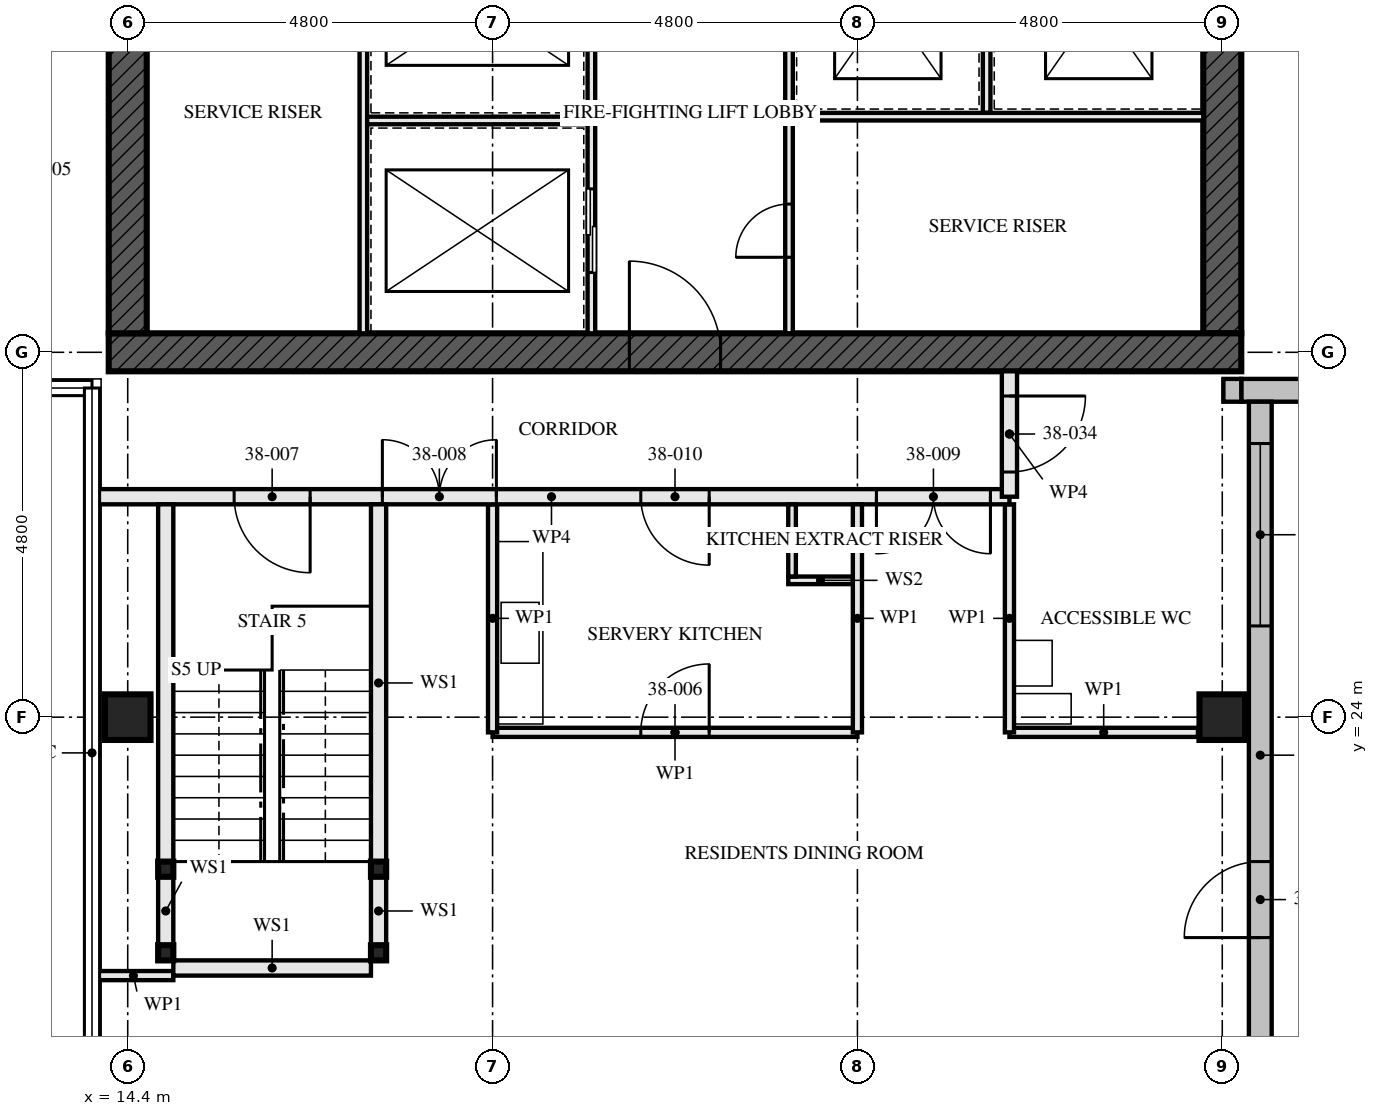
"""IFC4 building model, lengths in metres.
Left out: names, types, materials, properties, quantities, classifications, styles, units other than length and angle.
Written with IfcOpenShell. Run it as: python <this file> out.ifc"""

import sys

from ifc_helpers import new_model, si_unit, direction, frame, frame_2d, origin, origin_2d, place, context, subcontext, project, spatial, rectangle, hollow_rectangle, extrude, element, fill, save


model = new_model("IFC4")
c1 = context("Model", 3, precision=1e-05, world=origin(), true_north=direction((0.0, 1.0)))
c2 = subcontext(c1, "Body", "Model", "MODEL_VIEW")
j1 = project(units=[si_unit("LENGTHUNIT", "METRE"), si_unit("PLANEANGLEUNIT", "RADIAN")], contexts=[c1])
p1 = place(None, origin())
s1 = spatial("IfcSite", under=j1, at=p1, CompositionType="ELEMENT")
p2 = place(p1, origin())
s2 = spatial("IfcBuilding", under=s1, at=p2, CompositionType="ELEMENT")
p3 = place(p2, frame((0.0, 0.0, 141.0)))
s3 = spatial("IfcBuildingStorey", under=s2, at=p3, CompositionType="ELEMENT", Elevation=141.0)
for number, where, z_axis, x_axis in (
    (1, (14.4, 24.0, 0.0), (0.0, 0.0, 1.0), (1.0, 0.0, 0.0)),
    (2, (28.8, 24.0, 0.0), (0.0, 0.0, 1.0), (1.0, 0.0, 0.0)),
):
    element("IfcColumn", number, at=place(p3, frame(where, z_axis=z_axis, x_axis=x_axis)), inside=s3, PredefinedType="COLUMN", context=c2, shape_type="SweptSolid", body=[
        extrude(hollow_rectangle(XDim=0.6, YDim=0.6, WallThickness=0.08, at=origin_2d()), origin(), (0.0, 0.0, 1.0), 3.5),
    ])
p4 = place(p3, frame((14.15, 28.8, -0.17), z_axis=(0.0, 0.0, 1.0), x_axis=(1.0, 0.0, 0.0)))
e3 = element("IfcWall", 3, at=p4, inside=s3, PredefinedType="SHEAR", context=c2, shape_type="SweptSolid", body=[
    extrude(rectangle(XDim=14.9, YDim=0.5, at=frame_2d((7.45, 0.0))), origin(), (0.0, 0.0, 1.0), 3.5),
])
p5 = place(p4, frame((6.85, 0.0, 0.17)))
e4 = element("IfcOpeningElement", 4, at=p5, cuts=e3, PredefinedType="OPENING", context=c2, shape_type="SweptSolid", body=[
    extrude(rectangle(XDim=1.2, YDim=2.1, at=frame_2d((0.6, 1.05))), frame((0.0, 0.26, 0.0), z_axis=(0.0, -1.0, 0.0), x_axis=(1.0, 0.0, 0.0)), (0.0, 0.0, 1.0), 0.521),
])
p6 = place(p3, frame((14.4, 42.95, -0.17), z_axis=(0.0, 0.0, 1.0), x_axis=(0.0, -1.0, 0.0)))
e5 = element("IfcWall", 5, at=p6, inside=s3, PredefinedType="SHEAR", context=c2, shape_type="SweptSolid", body=[
    extrude(rectangle(XDim=13.9, YDim=0.5, at=frame_2d((6.95, 0.0))), origin(), (0.0, 0.0, 1.0), 3.5),
])
p7 = place(p6, frame((6.35, 0.0, 0.17)))
e6 = element("IfcOpeningElement", 6, at=p7, cuts=e5, PredefinedType="OPENING", context=c2, shape_type="SweptSolid", body=[
    extrude(rectangle(XDim=1.2, YDim=2.1, at=frame_2d((0.6, 1.05))), frame((0.0, 0.26, 0.0), z_axis=(0.0, -1.0, 0.0), x_axis=(1.0, 0.0, 0.0)), (0.0, 0.0, 1.0), 0.521),
])
p8 = place(p3, frame((28.8, 29.05, -0.17), z_axis=(0.0, 0.0, 1.0), x_axis=(0.0, 1.0, 0.0)))
e7 = element("IfcWall", 7, at=p8, inside=s3, PredefinedType="SHEAR", context=c2, shape_type="SweptSolid", body=[
    extrude(rectangle(XDim=13.9, YDim=0.5, at=frame_2d((6.95, 0.0))), origin(), (0.0, 0.0, 1.0), 3.5),
])
p9 = place(p8, frame((6.35, 0.0, 0.17)))
e8 = element("IfcOpeningElement", 8, at=p9, cuts=e7, PredefinedType="OPENING", context=c2, shape_type="SweptSolid", body=[
    extrude(rectangle(XDim=1.2, YDim=2.1, at=frame_2d((0.6, 1.05))), frame((0.0, 0.26, 0.0), z_axis=(0.0, -1.0, 0.0), x_axis=(1.0, 0.0, 0.0)), (0.0, 0.0, 1.0), 0.521),
])
for number, where, z_axis, x_axis in (
    (9, (14.9, 20.9, 0.0), (0.0, 0.0, 1.0), (1.0, 0.0, 0.0)),
    (10, (17.7, 20.9, 0.0), (0.0, 0.0, 1.0), (1.0, 0.0, 0.0)),
    (11, (14.9, 22.0, 0.0), (0.0, 0.0, 1.0), (1.0, 0.0, 0.0)),
    (12, (17.7, 22.0, 0.0), (0.0, 0.0, 1.0), (1.0, 0.0, 0.0)),
):
    element("IfcColumn", number, at=place(p3, frame(where, z_axis=z_axis, x_axis=x_axis)), inside=s3, PredefinedType="COLUMN", context=c2, shape_type="SweptSolid", body=[
        extrude(hollow_rectangle(XDim=0.2, YDim=0.2, WallThickness=0.008, at=origin_2d()), origin(), (0.0, 0.0, 1.0), 3.33),
    ])
p10 = place(p3, frame((29.05, 28.3, 0.0), z_axis=(0.0, 0.0, 1.0), x_axis=(1.0, 0.0, 0.0)))
e13 = element("IfcWall", 13, at=p10, inside=s3, PredefinedType="SOLIDWALL", context=c2, shape_type="SweptSolid", body=[
    extrude(rectangle(XDim=10.0, YDim=0.3, at=frame_2d((5.0, 0.0))), origin(), (0.0, 0.0, 1.0), 3.5),
])
p11 = place(p10, frame((0.95, 0.0, 0.6)))
e14 = element("IfcOpeningElement", 14, at=p11, cuts=e13, PredefinedType="OPENING", context=c2, shape_type="SweptSolid", body=[
    extrude(rectangle(XDim=2.4, YDim=1.8, at=frame_2d((1.2, 0.9))), frame((0.0, 0.161, 0.0), z_axis=(0.0, -1.0, 0.0), x_axis=(1.0, 0.0, 0.0)), (0.0, 0.0, 1.0), 0.321),
])
p12 = place(p10, frame((5.75, 0.0, 0.6)))
e15 = element("IfcOpeningElement", 15, at=p12, cuts=e13, PredefinedType="OPENING", context=c2, shape_type="SweptSolid", body=[
    extrude(rectangle(XDim=2.4, YDim=1.8, at=frame_2d((1.2, 0.9))), frame((0.0, 0.161, 0.0), z_axis=(0.0, -1.0, 0.0), x_axis=(1.0, 0.0, 0.0)), (0.0, 0.0, 1.0), 0.321),
])
p13 = place(p3, frame((29.3, 18.85, 0.0), z_axis=(0.0, 0.0, 1.0), x_axis=(0.0, 1.0, 0.0)))
e16 = element("IfcWall", 16, at=p13, inside=s3, PredefinedType="SOLIDWALL", context=c2, shape_type="SweptSolid", body=[
    extrude(rectangle(XDim=9.3, YDim=0.3, at=frame_2d((4.65, 0.0))), origin(), (0.0, 0.0, 1.0), 3.5),
])
p14 = place(p13, frame((2.25, 0.0, 0.0)))
e17 = element("IfcOpeningElement", 17, at=p14, cuts=e16, PredefinedType="OPENING", context=c2, shape_type="SweptSolid", body=[
    extrude(rectangle(XDim=1.0, YDim=2.4, at=frame_2d((0.5, 1.2))), frame((0.0, 0.161, 0.0), z_axis=(0.0, -1.0, 0.0), x_axis=(1.0, 0.0, 0.0)), (0.0, 0.0, 1.0), 0.321),
])
p15 = place(p13, frame((6.35, 0.0, 0.6)))
e18 = element("IfcOpeningElement", 18, at=p15, cuts=e16, PredefinedType="OPENING", context=c2, shape_type="SweptSolid", body=[
    extrude(rectangle(XDim=2.4, YDim=1.8, at=frame_2d((1.2, 0.9))), frame((0.0, 0.161, 0.0), z_axis=(0.0, -1.0, 0.0), x_axis=(1.0, 0.0, 0.0)), (0.0, 0.0, 1.0), 0.321),
])
p16 = place(p3, frame((28.815, 28.3, 2.39), z_axis=(0.0, 0.0, 1.0), x_axis=(1.0, 0.0, 0.0)))
e19 = element("IfcWall", 19, at=p16, inside=s3, PredefinedType="SOLIDWALL", context=c2, shape_type="SweptSolid", body=[
    extrude(rectangle(XDim=0.235, YDim=0.3, at=frame_2d((0.118, 0.0))), origin(), (0.0, 0.0, 1.0), 0.88),
])
p17 = place(p3, frame((14.9, 21.0, 0.0), z_axis=(0.0, 0.0, 1.0), x_axis=(0.0, 1.0, 0.0)))
e20 = element("IfcWall", 20, at=p17, inside=s3, PredefinedType="SOLIDWALL", context=c2, shape_type="SweptSolid", body=[
    extrude(rectangle(XDim=0.9, YDim=0.2, at=frame_2d((0.45, 0.0))), origin(), (0.0, 0.0, 1.0), 2.99),
])
p18 = place(p3, frame((14.9, 22.1, 0.0), z_axis=(0.0, 0.0, 1.0), x_axis=(0.0, 1.0, 0.0)))
e21 = element("IfcWall", 21, at=p18, inside=s3, PredefinedType="SOLIDWALL", context=c2, shape_type="SweptSolid", body=[
    extrude(rectangle(XDim=4.7, YDim=0.2, at=frame_2d((2.35, 0.0))), origin(), (0.0, 0.0, 1.0), 2.99),
])
p19 = place(p3, frame((17.7, 21.0, 0.0), z_axis=(0.0, 0.0, 1.0), x_axis=(0.0, 1.0, 0.0)))
e22 = element("IfcWall", 22, at=p19, inside=s3, PredefinedType="SOLIDWALL", context=c2, shape_type="SweptSolid", body=[
    extrude(rectangle(XDim=0.9, YDim=0.2, at=frame_2d((0.45, 0.0))), origin(), (0.0, 0.0, 1.0), 2.99),
])
p20 = place(p3, frame((17.7, 22.1, 0.0), z_axis=(0.0, 0.0, 1.0), x_axis=(0.0, 1.0, 0.0)))
e23 = element("IfcWall", 23, at=p20, inside=s3, PredefinedType="SOLIDWALL", context=c2, shape_type="SweptSolid", body=[
    extrude(rectangle(XDim=4.7, YDim=0.2, at=frame_2d((2.35, 0.0))), origin(), (0.0, 0.0, 1.0), 2.99),
])
p21 = place(p3, frame((15.0, 20.7, 0.0), z_axis=(0.0, 0.0, 1.0), x_axis=(1.0, 0.0, 0.0)))
e24 = element("IfcWall", 24, at=p21, inside=s3, PredefinedType="SOLIDWALL", context=c2, shape_type="SweptSolid", body=[
    extrude(rectangle(XDim=2.6, YDim=0.2, at=frame_2d((1.3, 0.0))), origin(), (0.0, 0.0, 1.0), 3.33),
])
p22 = place(p3, frame((24.0, 23.8, 0.0), z_axis=(0.0, 0.0, 1.0), x_axis=(0.0, 1.0, 0.0)))
e25 = element("IfcWall", 25, at=p22, inside=s3, PredefinedType="PARTITIONING", context=c2, shape_type="SweptSolid", body=[
    extrude(rectangle(XDim=3.0, YDim=0.12, at=frame_2d((1.5, 0.0))), origin(), (0.0, 0.0, 1.0), 2.55),
])
p23 = place(p3, frame((23.14, 25.85, 0.0), z_axis=(0.0, 0.0, 1.0), x_axis=(0.0, 1.0, 0.0)))
e26 = element("IfcWall", 26, at=p23, inside=s3, PredefinedType="SOLIDWALL", context=c2, shape_type="SweptSolid", body=[
    extrude(rectangle(XDim=0.95, YDim=0.1, at=frame_2d((0.475, 0.0))), origin(), (0.0, 0.0, 1.0), 3.33),
])
p24 = place(p3, frame((23.09, 25.8, 0.0), z_axis=(0.0, 0.0, 1.0), x_axis=(1.0, 0.0, 0.0)))
e27 = element("IfcWall", 27, at=p24, inside=s3, PredefinedType="SOLIDWALL", context=c2, shape_type="SweptSolid", body=[
    extrude(rectangle(XDim=0.85, YDim=0.1, at=frame_2d((0.425, 0.0))), origin(), (0.0, 0.0, 1.0), 3.33),
])
p25 = place(p3, frame((19.2, 23.8, 0.0), z_axis=(0.0, 0.0, 1.0), x_axis=(0.0, 1.0, 0.0)))
e28 = element("IfcWall", 28, at=p25, inside=s3, PredefinedType="PARTITIONING", context=c2, shape_type="SweptSolid", body=[
    extrude(rectangle(XDim=3.0, YDim=0.12, at=frame_2d((1.5, 0.0))), origin(), (0.0, 0.0, 1.0), 2.55),
])
p26 = place(p3, frame((19.2, 23.8, 0.0), z_axis=(0.0, 0.0, 1.0), x_axis=(1.0, 0.0, 0.0)))
e29 = element("IfcWall", 29, at=p26, inside=s3, PredefinedType="PARTITIONING", context=c2, shape_type="SweptSolid", body=[
    extrude(rectangle(XDim=4.8, YDim=0.12, at=frame_2d((2.4, 0.0))), origin(), (0.0, 0.0, 1.0), 3.33),
])
p27 = place(p26, frame((1.95, 0.0, 0.0)))
e30 = element("IfcOpeningElement", 30, at=p27, cuts=e29, PredefinedType="OPENING", context=c2, shape_type="SweptSolid", body=[
    extrude(rectangle(XDim=0.9, YDim=2.1, at=frame_2d((0.45, 1.05))), frame((0.0, 0.071, 0.0), z_axis=(0.0, -1.0, 0.0), x_axis=(1.0, 0.0, 0.0)), (0.0, 0.0, 1.0), 0.141),
])
p28 = place(p3, frame((26.0, 23.8, 0.0), z_axis=(0.0, 0.0, 1.0), x_axis=(0.0, 1.0, 0.0)))
e31 = element("IfcWall", 31, at=p28, inside=s3, PredefinedType="PARTITIONING", context=c2, shape_type="SweptSolid", body=[
    extrude(rectangle(XDim=3.0, YDim=0.12, at=frame_2d((1.5, 0.0))), origin(), (0.0, 0.0, 1.0), 2.55),
])
p29 = place(p3, frame((26.0, 23.8, 0.0), z_axis=(0.0, 0.0, 1.0), x_axis=(1.0, 0.0, 0.0)))
e32 = element("IfcWall", 32, at=p29, inside=s3, PredefinedType="PARTITIONING", context=c2, shape_type="SweptSolid", body=[
    extrude(rectangle(XDim=2.48, YDim=0.12, at=frame_2d((1.24, 0.0))), origin(), (0.0, 0.0, 1.0), 3.33),
])
p30 = place(p3, frame((13.95, 20.6, 0.0), z_axis=(0.0, 0.0, 1.0), x_axis=(1.0, 0.0, 0.0)))
e33 = element("IfcWall", 33, at=p30, inside=s3, PredefinedType="PARTITIONING", context=c2, shape_type="SweptSolid", body=[
    extrude(rectangle(XDim=1.05, YDim=0.12, at=frame_2d((0.525, 0.0))), origin(), (0.0, 0.0, 1.0), 2.32),
])
p31 = place(p3, frame((13.95, 26.9, 0.0), z_axis=(0.0, 0.0, 1.0), x_axis=(1.0, 0.0, 0.0)))
e34 = element("IfcWall", 34, at=p31, inside=s3, PredefinedType="PARTITIONING", context=c2, shape_type="SweptSolid", body=[
    extrude(rectangle(XDim=12.05, YDim=0.2, at=frame_2d((6.025, 0.0))), origin(), (0.0, 0.0, 1.0), 2.32),
])
p32 = place(p31, frame((1.85, 0.0, 0.0)))
e35 = element("IfcOpeningElement", 35, at=p32, cuts=e34, PredefinedType="OPENING", context=c2, shape_type="SweptSolid", body=[
    extrude(rectangle(XDim=1.0, YDim=2.1, at=frame_2d((0.5, 1.05))), frame((0.0, 0.111, 0.0), z_axis=(0.0, -1.0, 0.0), x_axis=(1.0, 0.0, 0.0)), (0.0, 0.0, 1.0), 0.221),
])
p33 = place(p31, frame((3.8, 0.0, 0.0)))
e36 = element("IfcOpeningElement", 36, at=p33, cuts=e34, PredefinedType="OPENING", context=c2, shape_type="SweptSolid", body=[
    extrude(rectangle(XDim=1.5, YDim=2.1, at=frame_2d((0.75, 1.05))), frame((0.0, 0.111, 0.0), z_axis=(0.0, -1.0, 0.0), x_axis=(1.0, 0.0, 0.0)), (0.0, 0.0, 1.0), 0.221),
])
p34 = place(p31, frame((10.3, 0.0, 0.0)))
e37 = element("IfcOpeningElement", 37, at=p34, cuts=e34, PredefinedType="OPENING", context=c2, shape_type="SweptSolid", body=[
    extrude(rectangle(XDim=1.5, YDim=2.1, at=frame_2d((0.75, 1.05))), frame((0.0, 0.111, 0.0), z_axis=(0.0, -1.0, 0.0), x_axis=(1.0, 0.0, 0.0)), (0.0, 0.0, 1.0), 0.221),
])
p35 = place(p31, frame((7.2, 0.0, 0.0)))
e38 = element("IfcOpeningElement", 38, at=p35, cuts=e34, PredefinedType="OPENING", context=c2, shape_type="SweptSolid", body=[
    extrude(rectangle(XDim=0.9, YDim=2.1, at=frame_2d((0.45, 1.05))), frame((0.0, 0.111, 0.0), z_axis=(0.0, -1.0, 0.0), x_axis=(1.0, 0.0, 0.0)), (0.0, 0.0, 1.0), 0.221),
])
p36 = place(p3, frame((20.5, 29.05, 0.0), z_axis=(0.0, 0.0, 1.0), x_axis=(0.0, 1.0, 0.0)))
e39 = element("IfcWall", 39, at=p36, inside=s3, PredefinedType="SOLIDWALL", context=c2, shape_type="SweptSolid", body=[
    extrude(rectangle(XDim=5.8, YDim=0.1, at=frame_2d((2.9, 0.0))), origin(), (0.0, 0.0, 1.0), 3.33),
])
p37 = place(p36, frame((0.8, 0.0, 0.0)))
e40 = element("IfcOpeningElement", 40, at=p37, cuts=e39, PredefinedType="OPENING", context=c2, shape_type="SweptSolid", body=[
    extrude(rectangle(XDim=1.1, YDim=2.3, at=frame_2d((0.55, 1.15))), frame((0.0, 0.061, 0.0), z_axis=(0.0, -1.0, 0.0), x_axis=(1.0, 0.0, 0.0)), (0.0, 0.0, 1.0), 0.121),
])
p38 = place(p36, frame((3.775, 0.0, 0.0)))
e41 = element("IfcOpeningElement", 41, at=p38, cuts=e39, PredefinedType="OPENING", context=c2, shape_type="SweptSolid", body=[
    extrude(rectangle(XDim=1.1, YDim=2.3, at=frame_2d((0.55, 1.15))), frame((0.0, 0.061, 0.0), z_axis=(0.0, -1.0, 0.0), x_axis=(1.0, 0.0, 0.0)), (0.0, 0.0, 1.0), 0.121),
])
p39 = place(p3, frame((23.1, 29.05, 0.0), z_axis=(0.0, 0.0, 1.0), x_axis=(0.0, 1.0, 0.0)))
e42 = element("IfcWall", 42, at=p39, inside=s3, PredefinedType="SOLIDWALL", context=c2, shape_type="SweptSolid", body=[
    extrude(rectangle(XDim=5.8, YDim=0.1, at=frame_2d((2.9, 0.0))), origin(), (0.0, 0.0, 1.0), 3.33),
])
p40 = place(p39, frame((1.0, 0.0, 0.0)))
e43 = element("IfcOpeningElement", 43, at=p40, cuts=e42, PredefinedType="OPENING", context=c2, shape_type="SweptSolid", body=[
    extrude(rectangle(XDim=0.7, YDim=2.1, at=frame_2d((0.35, 1.05))), frame((0.0, 0.061, 0.0), z_axis=(0.0, -1.0, 0.0), x_axis=(1.0, 0.0, 0.0)), (0.0, 0.0, 1.0), 0.121),
])
p41 = place(p3, frame((17.5, 29.05, 0.0), z_axis=(0.0, 0.0, 1.0), x_axis=(0.0, 1.0, 0.0)))
e44 = element("IfcWall", 44, at=p41, inside=s3, PredefinedType="SOLIDWALL", context=c2, shape_type="SweptSolid", body=[
    extrude(rectangle(XDim=5.8, YDim=0.1, at=frame_2d((2.9, 0.0))), origin(), (0.0, 0.0, 1.0), 3.33),
])
p42 = place(p3, frame((17.55, 31.85, 0.0), z_axis=(0.0, 0.0, 1.0), x_axis=(1.0, 0.0, 0.0)))
e45 = element("IfcWall", 45, at=p42, inside=s3, PredefinedType="SOLIDWALL", context=c2, shape_type="SweptSolid", body=[
    extrude(rectangle(XDim=2.9, YDim=0.1, at=frame_2d((1.45, 0.0))), origin(), (0.0, 0.0, 1.0), 3.33),
])
p43 = place(p3, frame((25.7, 31.95, 0.0), z_axis=(0.0, 0.0, 1.0), x_axis=(0.0, 1.0, 0.0)))
e46 = element("IfcWall", 46, at=p43, inside=s3, PredefinedType="SOLIDWALL", context=c2, shape_type="SweptSolid", body=[
    extrude(rectangle(XDim=2.9, YDim=0.1, at=frame_2d((1.45, 0.0))), origin(), (0.0, 0.0, 1.0), 3.33),
])
p44 = place(p3, frame((23.15, 31.9, 0.0), z_axis=(0.0, 0.0, 1.0), x_axis=(1.0, 0.0, 0.0)))
e47 = element("IfcWall", 47, at=p44, inside=s3, PredefinedType="SOLIDWALL", context=c2, shape_type="SweptSolid", body=[
    extrude(rectangle(XDim=5.4, YDim=0.1, at=frame_2d((2.7, 0.0))), origin(), (0.0, 0.0, 1.0), 3.33),
])
p45 = place(p3, frame((26.0, 26.9, 0.0), z_axis=(0.0, 0.0, 1.0), x_axis=(0.0, 1.0, 0.0)))
e48 = element("IfcWall", 48, at=p45, inside=s3, PredefinedType="PARTITIONING", context=c2, shape_type="SweptSolid", body=[
    extrude(rectangle(XDim=1.65, YDim=0.2, at=frame_2d((0.825, 0.0))), origin(), (0.0, 0.0, 1.0), 3.33),
])
p46 = place(p45, frame((0.325, 0.0, 0.0)))
e49 = element("IfcOpeningElement", 49, at=p46, cuts=e48, PredefinedType="OPENING", context=c2, shape_type="SweptSolid", body=[
    extrude(rectangle(XDim=1.0, YDim=2.1, at=frame_2d((0.5, 1.05))), frame((0.0, 0.111, 0.0), z_axis=(0.0, -1.0, 0.0), x_axis=(1.0, 0.0, 0.0)), (0.0, 0.0, 1.0), 0.221),
])
p47 = place(p14, origin())
e50 = element("IfcDoor", 50, at=p47, inside=s3, OperationType="SINGLE_SWING_LEFT", PredefinedType="DOOR", context=c2, shape_type="SweptSolid", body=[
    extrude(rectangle(XDim=1.0, YDim=2.4, at=frame_2d((0.5, 1.2))), frame((0.0, 0.035, 0.0), z_axis=(0.0, -1.0, 0.0), x_axis=(1.0, 0.0, 0.0)), (0.0, 0.0, 1.0), 0.07),
])
fill(e17, e50)
p48 = place(p15, origin())
e51 = element("IfcWindow", 51, at=p48, inside=s3, PartitioningType="SINGLE_PANEL", PredefinedType="WINDOW", context=c2, shape_type="SweptSolid", body=[
    extrude(rectangle(XDim=2.4, YDim=1.8, at=frame_2d((1.2, 0.9))), frame((0.0, 0.03, 0.0), z_axis=(0.0, -1.0, 0.0), x_axis=(1.0, 0.0, 0.0)), (0.0, 0.0, 1.0), 0.06),
])
fill(e18, e51)
p49 = place(p27, origin())
e52 = element("IfcDoor", 52, at=p49, inside=s3, OperationType="SINGLE_SWING_LEFT", PredefinedType="DOOR", context=c2, shape_type="SweptSolid", body=[
    extrude(rectangle(XDim=0.9, YDim=2.1, at=frame_2d((0.45, 1.05))), frame((0.0, 0.022, 0.0), z_axis=(0.0, -1.0, 0.0), x_axis=(1.0, 0.0, 0.0)), (0.0, 0.0, 1.0), 0.044),
])
fill(e30, e52)
p50 = place(p32, frame((1.0, 0.0, 0.0), z_axis=(0.0, 0.0, 1.0), x_axis=(-1.0, 0.0, 0.0)))
e53 = element("IfcDoor", 53, at=p50, inside=s3, OperationType="SINGLE_SWING_RIGHT", PredefinedType="DOOR", context=c2, shape_type="SweptSolid", body=[
    extrude(rectangle(XDim=1.0, YDim=2.1, at=frame_2d((0.5, 1.05))), frame((0.0, 0.032, 0.0), z_axis=(0.0, -1.0, 0.0), x_axis=(1.0, 0.0, 0.0)), (0.0, 0.0, 1.0), 0.064),
])
fill(e35, e53)
p51 = place(p33, origin())
e54 = element("IfcDoor", 54, at=p51, inside=s3, OperationType="DOUBLE_DOOR_SINGLE_SWING", PredefinedType="DOOR", context=c2, shape_type="SweptSolid", body=[
    extrude(rectangle(XDim=1.5, YDim=2.1, at=frame_2d((0.75, 1.05))), frame((0.0, 0.027, 0.0), z_axis=(0.0, -1.0, 0.0), x_axis=(1.0, 0.0, 0.0)), (0.0, 0.0, 1.0), 0.054),
])
fill(e36, e54)
p52 = place(p34, frame((1.5, 0.0, 0.0), z_axis=(0.0, 0.0, 1.0), x_axis=(-1.0, 0.0, 0.0)))
e55 = element("IfcDoor", 55, at=p52, inside=s3, OperationType="DOUBLE_DOOR_SINGLE_SWING", PredefinedType="DOOR", context=c2, shape_type="SweptSolid", body=[
    extrude(rectangle(XDim=1.5, YDim=2.1, at=frame_2d((0.75, 1.05))), frame((0.0, 0.027, 0.0), z_axis=(0.0, -1.0, 0.0), x_axis=(1.0, 0.0, 0.0)), (0.0, 0.0, 1.0), 0.054),
])
fill(e37, e55)
p53 = place(p35, frame((0.9, 0.0, 0.0), z_axis=(0.0, 0.0, 1.0), x_axis=(-1.0, 0.0, 0.0)))
e56 = element("IfcDoor", 56, at=p53, inside=s3, OperationType="SINGLE_SWING_RIGHT", PredefinedType="DOOR", context=c2, shape_type="SweptSolid", body=[
    extrude(rectangle(XDim=0.9, YDim=2.1, at=frame_2d((0.45, 1.05))), frame((0.0, 0.027, 0.0), z_axis=(0.0, -1.0, 0.0), x_axis=(1.0, 0.0, 0.0)), (0.0, 0.0, 1.0), 0.054),
])
fill(e38, e56)
p54 = place(p37, origin())
e57 = element("IfcDoor", 57, at=p54, inside=s3, OperationType="SLIDING_TO_LEFT", PredefinedType="DOOR", context=c2, shape_type="SweptSolid", body=[
    extrude(rectangle(XDim=1.1, YDim=2.3, at=frame_2d((0.55, 1.15))), frame((0.0, 0.05, 0.0), z_axis=(0.0, -1.0, 0.0), x_axis=(1.0, 0.0, 0.0)), (0.0, 0.0, 1.0), 0.1),
])
fill(e40, e57)
p55 = place(p40, origin())
e58 = element("IfcDoor", 58, at=p55, inside=s3, OperationType="SINGLE_SWING_RIGHT", PredefinedType="DOOR", context=c2, shape_type="SweptSolid", body=[
    extrude(rectangle(XDim=0.7, YDim=2.1, at=frame_2d((0.35, 1.05))), frame((0.0, 0.027, 0.0), z_axis=(0.0, -1.0, 0.0), x_axis=(1.0, 0.0, 0.0)), (0.0, 0.0, 1.0), 0.054),
])
fill(e43, e58)
p56 = place(p46, frame((1.0, 0.0, 0.0), z_axis=(0.0, 0.0, 1.0), x_axis=(-1.0, 0.0, 0.0)))
e59 = element("IfcDoor", 59, at=p56, inside=s3, OperationType="SINGLE_SWING_RIGHT", PredefinedType="DOOR", context=c2, shape_type="SweptSolid", body=[
    extrude(rectangle(XDim=1.0, YDim=2.1, at=frame_2d((0.5, 1.05))), frame((0.0, 0.027, 0.0), z_axis=(0.0, -1.0, 0.0), x_axis=(1.0, 0.0, 0.0)), (0.0, 0.0, 1.0), 0.054),
])
fill(e49, e59)
p57 = place(p5, origin())
e60 = element("IfcDoor", 60, at=p57, inside=s3, OperationType="SINGLE_SWING_LEFT", PredefinedType="DOOR", context=c2, shape_type="SweptSolid", body=[
    extrude(rectangle(XDim=1.2, YDim=2.1, at=frame_2d((0.6, 1.05))), frame((0.0, 0.027, 0.0), z_axis=(0.0, -1.0, 0.0), x_axis=(1.0, 0.0, 0.0)), (0.0, 0.0, 1.0), 0.054),
])
fill(e4, e60)
save(model, sys.argv[1])
